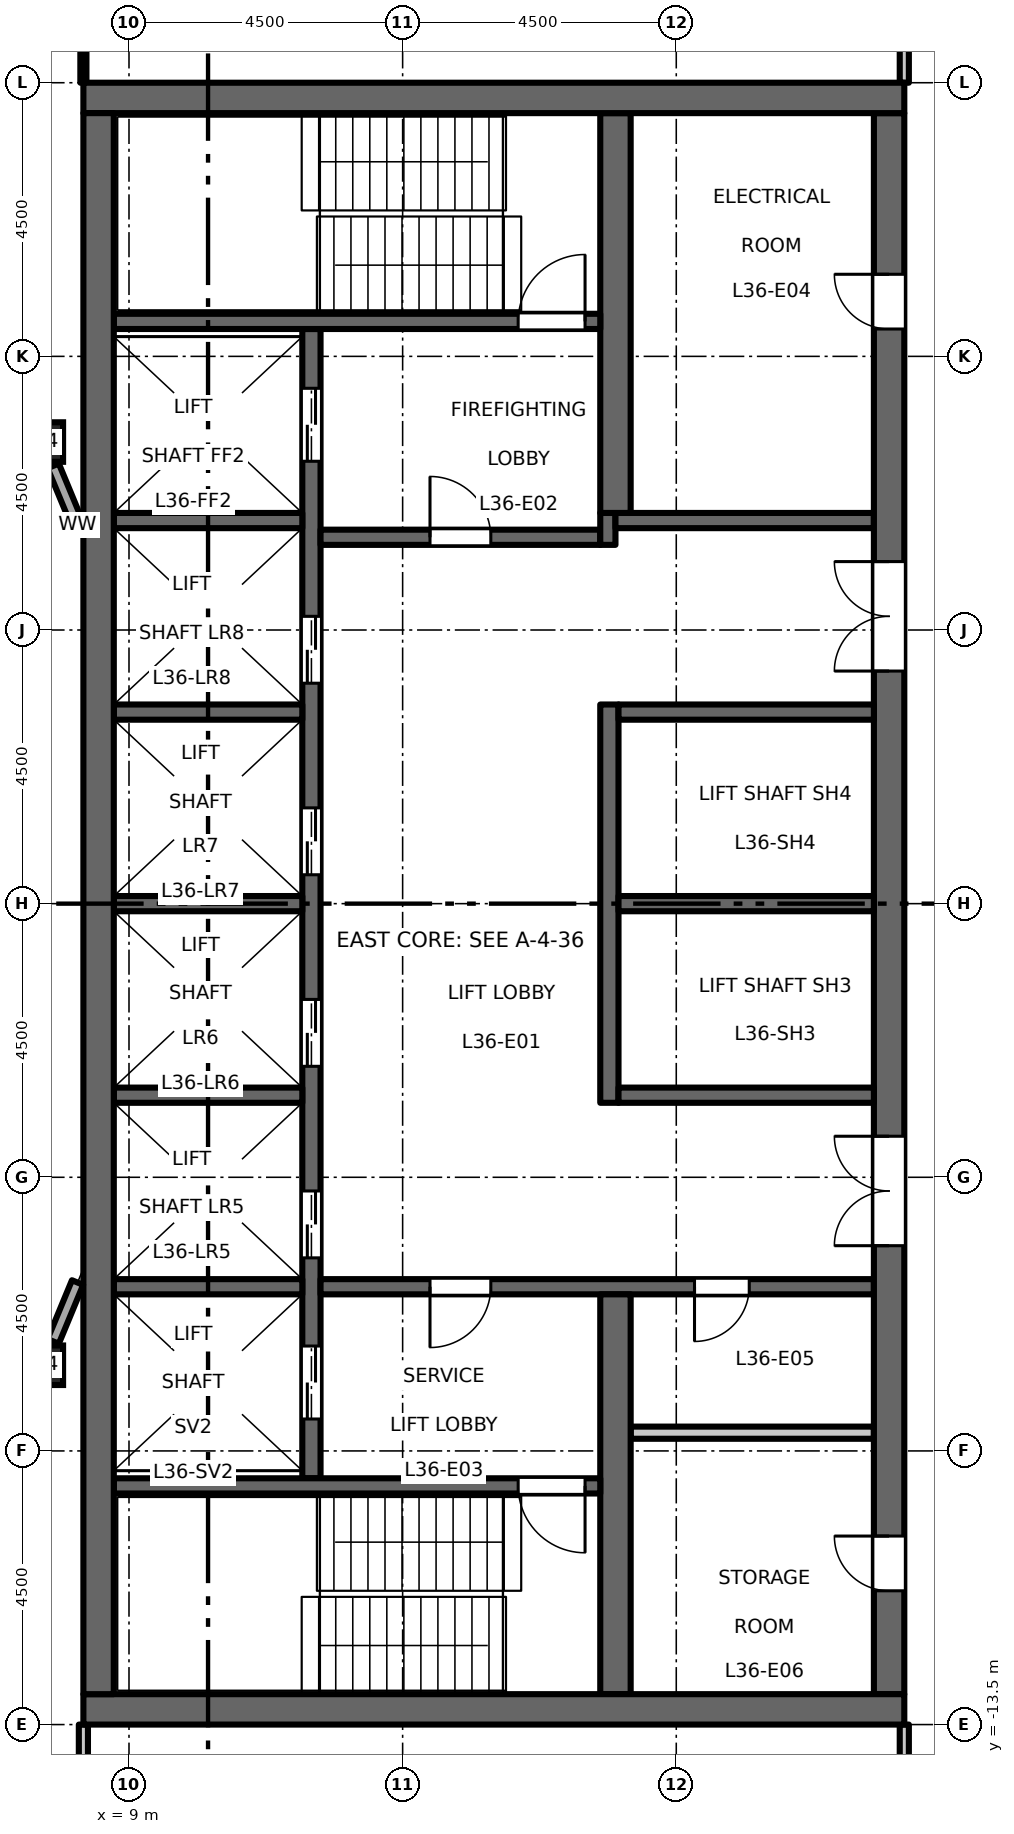
"""IFC4 building model, lengths in metres.
Left out: names, types, materials, properties, quantities, classifications, styles, units other than length and angle.
Written with IfcOpenShell. Run it as: python <this file> out.ifc"""

import sys

from ifc_helpers import new_model, si_unit, direction, frame, frame_2d, origin, origin_2d, place, context, subcontext, project, spatial, rectangle, hollow_rectangle, extrude, element, fill, save


model = new_model("IFC4")
c1 = context("Model", 3, precision=1e-05, world=origin(), true_north=direction((0.0, 1.0)))
c2 = subcontext(c1, "Body", "Model", "MODEL_VIEW")
j1 = project(units=[si_unit("LENGTHUNIT", "METRE"), si_unit("PLANEANGLEUNIT", "RADIAN")], contexts=[c1])
p1 = place(None, origin())
s1 = spatial("IfcSite", under=j1, at=p1, CompositionType="ELEMENT")
p2 = place(p1, origin())
s2 = spatial("IfcBuilding", under=s1, at=p2, CompositionType="ELEMENT")
p3 = place(p2, frame((0.0, 0.0, 167.7)))
s3 = spatial("IfcBuildingStorey", under=s2, at=p3, CompositionType="ELEMENT", Elevation=167.7)
for number, where, z_axis, x_axis in (
    (1, (7.591, -7.591, 0.0), (0.0, 0.0, 1.0), (1.0, 0.0, 0.0)),
    (2, (7.591, 7.591, 0.0), (0.0, 0.0, 1.0), (1.0, 0.0, 0.0)),
):
    element("IfcColumn", number, at=place(p3, frame(where, z_axis=z_axis, x_axis=x_axis)), inside=s3, PredefinedType="COLUMN", context=c2, shape_type="SweptSolid", body=[
        extrude(hollow_rectangle(XDim=0.65, YDim=0.65, WallThickness=0.036, at=origin_2d()), origin(), (0.0, 0.0, 1.0), 4.5),
    ])
p4 = place(p3, frame((12.0, -9.45, 0.0), z_axis=(0.0, 0.0, 1.0), x_axis=(0.0, 1.0, 0.0)))
e3 = element("IfcWall", 3, at=p4, inside=s3, PredefinedType="SHEAR", context=c2, shape_type="SweptSolid", body=[
    extrude(rectangle(XDim=18.9, YDim=0.3, at=frame_2d((9.45, 0.0))), origin(), (0.0, 0.0, 1.0), 4.35),
])
p5 = place(p4, frame((3.625, 0.0, 0.0)))
e4 = element("IfcOpeningElement", 4, at=p5, cuts=e3, PredefinedType="OPENING", context=c2, shape_type="SweptSolid", body=[
    extrude(rectangle(XDim=1.1, YDim=2.1, at=frame_2d((0.55, 1.05))), frame((0.0, 0.16, 0.0), z_axis=(0.0, -1.0, 0.0), x_axis=(1.0, 0.0, 0.0)), (0.0, 0.0, 1.0), 0.32),
])
p6 = place(p4, frame((6.775, 0.0, 0.0)))
e5 = element("IfcOpeningElement", 5, at=p6, cuts=e3, PredefinedType="OPENING", context=c2, shape_type="SweptSolid", body=[
    extrude(rectangle(XDim=1.1, YDim=2.1, at=frame_2d((0.55, 1.05))), frame((0.0, 0.16, 0.0), z_axis=(0.0, -1.0, 0.0), x_axis=(1.0, 0.0, 0.0)), (0.0, 0.0, 1.0), 0.32),
])
p7 = place(p4, frame((9.925, 0.0, 0.0)))
e6 = element("IfcOpeningElement", 6, at=p7, cuts=e3, PredefinedType="OPENING", context=c2, shape_type="SweptSolid", body=[
    extrude(rectangle(XDim=1.1, YDim=2.1, at=frame_2d((0.55, 1.05))), frame((0.0, 0.16, 0.0), z_axis=(0.0, -1.0, 0.0), x_axis=(1.0, 0.0, 0.0)), (0.0, 0.0, 1.0), 0.32),
])
p8 = place(p4, frame((13.075, 0.0, 0.0)))
e7 = element("IfcOpeningElement", 7, at=p8, cuts=e3, PredefinedType="OPENING", context=c2, shape_type="SweptSolid", body=[
    extrude(rectangle(XDim=1.1, YDim=2.1, at=frame_2d((0.55, 1.05))), frame((0.0, 0.16, 0.0), z_axis=(0.0, -1.0, 0.0), x_axis=(1.0, 0.0, 0.0)), (0.0, 0.0, 1.0), 0.32),
])
p9 = place(p4, frame((16.725, 0.0, 0.0)))
e8 = element("IfcOpeningElement", 8, at=p9, cuts=e3, PredefinedType="OPENING", context=c2, shape_type="SweptSolid", body=[
    extrude(rectangle(XDim=1.2, YDim=2.1, at=frame_2d((0.6, 1.05))), frame((0.0, 0.16, 0.0), z_axis=(0.0, -1.0, 0.0), x_axis=(1.0, 0.0, 0.0)), (0.0, 0.0, 1.0), 0.32),
])
p10 = place(p4, frame((0.975, 0.0, 0.0)))
e9 = element("IfcOpeningElement", 9, at=p10, cuts=e3, PredefinedType="OPENING", context=c2, shape_type="SweptSolid", body=[
    extrude(rectangle(XDim=1.2, YDim=2.1, at=frame_2d((0.6, 1.05))), frame((0.0, 0.16, 0.0), z_axis=(0.0, -1.0, 0.0), x_axis=(1.0, 0.0, 0.0)), (0.0, 0.0, 1.0), 0.32),
])
p11 = place(p3, frame((12.15, 6.025, 0.0), z_axis=(0.0, 0.0, 1.0), x_axis=(1.0, 0.0, 0.0)))
e10 = element("IfcWall", 10, at=p11, inside=s3, PredefinedType="SHEAR", context=c2, shape_type="SweptSolid", body=[
    extrude(rectangle(XDim=4.6, YDim=0.25, at=frame_2d((2.3, 0.0))), origin(), (0.0, 0.0, 1.0), 4.35),
])
p12 = place(p11, frame((1.8, 0.0, 0.0)))
e11 = element("IfcOpeningElement", 11, at=p12, cuts=e10, PredefinedType="OPENING", context=c2, shape_type="SweptSolid", body=[
    extrude(rectangle(XDim=1.0, YDim=2.1, at=frame_2d((0.5, 1.05))), frame((0.0, 0.135, 0.0), z_axis=(0.0, -1.0, 0.0), x_axis=(1.0, 0.0, 0.0)), (0.0, 0.0, 1.0), 0.27),
])
p13 = place(p3, frame((16.875, 5.9, 0.0), z_axis=(0.0, 0.0, 1.0), x_axis=(0.0, 1.0, 0.0)))
e12 = element("IfcWall", 12, at=p13, inside=s3, PredefinedType="SHEAR", context=c2, shape_type="SweptSolid", body=[
    extrude(rectangle(XDim=0.525, YDim=0.25, at=frame_2d((0.263, 0.0))), origin(), (0.0, 0.0, 1.0), 4.35),
])
p14 = place(p3, frame((17.0, 6.3, 0.0), z_axis=(0.0, 0.0, 1.0), x_axis=(1.0, 0.0, 0.0)))
e13 = element("IfcWall", 13, at=p14, inside=s3, PredefinedType="SHEAR", context=c2, shape_type="SweptSolid", body=[
    extrude(rectangle(XDim=4.25, YDim=0.25, at=frame_2d((2.125, 0.0))), origin(), (0.0, 0.0, 1.0), 4.35),
])
p15 = place(p3, frame((12.15, -6.3, 0.0), z_axis=(0.0, 0.0, 1.0), x_axis=(1.0, 0.0, 0.0)))
e14 = element("IfcWall", 14, at=p15, inside=s3, PredefinedType="SHEAR", context=c2, shape_type="SweptSolid", body=[
    extrude(rectangle(XDim=9.1, YDim=0.25, at=frame_2d((4.55, 0.0))), origin(), (0.0, 0.0, 1.0), 4.35),
])
p16 = place(p15, frame((1.8, 0.0, 0.0)))
e15 = element("IfcOpeningElement", 15, at=p16, cuts=e14, PredefinedType="OPENING", context=c2, shape_type="SweptSolid", body=[
    extrude(rectangle(XDim=1.0, YDim=2.1, at=frame_2d((0.5, 1.05))), frame((0.0, 0.135, 0.0), z_axis=(0.0, -1.0, 0.0), x_axis=(1.0, 0.0, 0.0)), (0.0, 0.0, 1.0), 0.27),
])
p17 = place(p15, frame((6.15, 0.0, 0.0)))
e16 = element("IfcOpeningElement", 16, at=p17, cuts=e14, PredefinedType="OPENING", context=c2, shape_type="SweptSolid", body=[
    extrude(rectangle(XDim=0.9, YDim=2.1, at=frame_2d((0.45, 1.05))), frame((0.0, 0.135, 0.0), z_axis=(0.0, -1.0, 0.0), x_axis=(1.0, 0.0, 0.0)), (0.0, 0.0, 1.0), 0.27),
])
p18 = place(p3, frame((21.5, -13.0, 0.0), z_axis=(0.0, 0.0, 1.0), x_axis=(0.0, 1.0, 0.0)))
e17 = element("IfcWall", 17, at=p18, inside=s3, PredefinedType="SHEAR", context=c2, shape_type="SweptSolid", body=[
    extrude(rectangle(XDim=26.0, YDim=0.5, at=frame_2d((13.0, 0.0))), origin(), (0.0, 0.0, 1.0), 4.35),
])
p19 = place(p18, frame((16.825, 0.0, 0.0)))
e18 = element("IfcOpeningElement", 18, at=p19, cuts=e17, PredefinedType="OPENING", context=c2, shape_type="SweptSolid", body=[
    extrude(rectangle(XDim=1.8, YDim=2.1, at=frame_2d((0.9, 1.05))), frame((0.0, 0.26, 0.0), z_axis=(0.0, -1.0, 0.0), x_axis=(1.0, 0.0, 0.0)), (0.0, 0.0, 1.0), 0.52),
])
p20 = place(p18, frame((7.375, 0.0, 0.0)))
e19 = element("IfcOpeningElement", 19, at=p20, cuts=e17, PredefinedType="OPENING", context=c2, shape_type="SweptSolid", body=[
    extrude(rectangle(XDim=1.8, YDim=2.1, at=frame_2d((0.9, 1.05))), frame((0.0, 0.26, 0.0), z_axis=(0.0, -1.0, 0.0), x_axis=(1.0, 0.0, 0.0)), (0.0, 0.0, 1.0), 0.52),
])
p21 = place(p18, frame((22.45, 0.0, 0.0)))
e20 = element("IfcOpeningElement", 20, at=p21, cuts=e17, PredefinedType="OPENING", context=c2, shape_type="SweptSolid", body=[
    extrude(rectangle(XDim=0.9, YDim=2.1, at=frame_2d((0.45, 1.05))), frame((0.0, 0.26, 0.0), z_axis=(0.0, -1.0, 0.0), x_axis=(1.0, 0.0, 0.0)), (0.0, 0.0, 1.0), 0.52),
])
p22 = place(p18, frame((1.7, 0.0, 0.0)))
e21 = element("IfcOpeningElement", 21, at=p22, cuts=e17, PredefinedType="OPENING", context=c2, shape_type="SweptSolid", body=[
    extrude(rectangle(XDim=0.9, YDim=2.1, at=frame_2d((0.45, 1.05))), frame((0.0, 0.26, 0.0), z_axis=(0.0, -1.0, 0.0), x_axis=(1.0, 0.0, 0.0)), (0.0, 0.0, 1.0), 0.52),
])
p23 = place(p3, frame((17.25, -8.7, 0.0), z_axis=(0.0, 0.0, 1.0), x_axis=(1.0, 0.0, 0.0)))
e22 = element("IfcWall", 22, at=p23, inside=s3, PredefinedType="PARTITIONING", context=c2, shape_type="SweptSolid", body=[
    extrude(rectangle(XDim=4.0, YDim=0.2, at=frame_2d((2.0, 0.0))), origin(), (0.0, 0.0, 1.0), 4.35),
])
p24 = place(p3, frame((16.9, -3.275, 0.0), z_axis=(0.0, 0.0, 1.0), x_axis=(0.0, 1.0, 0.0)))
e23 = element("IfcWall", 23, at=p24, inside=s3, PredefinedType="SHEAR", context=c2, shape_type="SweptSolid", body=[
    extrude(rectangle(XDim=6.55, YDim=0.3, at=frame_2d((3.275, 0.0))), origin(), (0.0, 0.0, 1.0), 4.35),
])
for number, where, z_axis, x_axis in (
    (24, (17.05, 0.0, 0.0), (0.0, 0.0, 1.0), (1.0, 0.0, 0.0)),
    (25, (17.05, 3.15, 0.0), (0.0, 0.0, 1.0), (1.0, 0.0, 0.0)),
    (26, (17.05, -3.15, 0.0), (0.0, 0.0, 1.0), (1.0, 0.0, 0.0)),
):
    element("IfcWall", number, at=place(p3, frame(where, z_axis=z_axis, x_axis=x_axis)), inside=s3, PredefinedType="SHEAR", context=c2, shape_type="SweptSolid", body=[
        extrude(rectangle(XDim=4.2, YDim=0.25, at=frame_2d((2.1, 0.0))), origin(), (0.0, 0.0, 1.0), 4.35),
    ])
for number, where, z_axis, x_axis in (
    (27, (17.0, 6.425, 0.0), (0.0, 0.0, 1.0), (0.0, 1.0, 0.0)),
    (28, (17.0, -13.0, 0.0), (0.0, 0.0, 1.0), (0.0, 1.0, 0.0)),
):
    element("IfcWall", number, at=place(p3, frame(where, z_axis=z_axis, x_axis=x_axis)), inside=s3, PredefinedType="SHEAR", context=c2, shape_type="SweptSolid", body=[
        extrude(rectangle(XDim=6.575, YDim=0.5, at=frame_2d((3.288, 0.0))), origin(), (0.0, 0.0, 1.0), 4.35),
    ])
for number, where, z_axis, x_axis in (
    (29, (8.75, 0.0, 0.0), (0.0, 0.0, 1.0), (1.0, 0.0, 0.0)),
    (30, (8.75, 3.15, 0.0), (0.0, 0.0, 1.0), (1.0, 0.0, 0.0)),
    (31, (8.75, 6.3, 0.0), (0.0, 0.0, 1.0), (1.0, 0.0, 0.0)),
    (32, (8.75, -3.15, 0.0), (0.0, 0.0, 1.0), (1.0, 0.0, 0.0)),
    (33, (8.75, -6.3, 0.0), (0.0, 0.0, 1.0), (1.0, 0.0, 0.0)),
):
    element("IfcWall", number, at=place(p3, frame(where, z_axis=z_axis, x_axis=x_axis)), inside=s3, PredefinedType="SHEAR", context=c2, shape_type="SweptSolid", body=[
        extrude(rectangle(XDim=3.1, YDim=0.25, at=frame_2d((1.55, 0.0))), origin(), (0.0, 0.0, 1.0), 4.35),
    ])
p25 = place(p3, frame((8.75, 9.575, 0.0), z_axis=(0.0, 0.0, 1.0), x_axis=(1.0, 0.0, 0.0)))
e34 = element("IfcWall", 34, at=p25, inside=s3, PredefinedType="SHEAR", context=c2, shape_type="SweptSolid", body=[
    extrude(rectangle(XDim=8.0, YDim=0.25, at=frame_2d((4.0, 0.0))), origin(), (0.0, 0.0, 1.0), 4.35),
])
p26 = place(p25, frame((6.65, 0.0, 0.0)))
e35 = element("IfcOpeningElement", 35, at=p26, cuts=e34, PredefinedType="OPENING", context=c2, shape_type="SweptSolid", body=[
    extrude(rectangle(XDim=1.1, YDim=2.1, at=frame_2d((0.55, 1.05))), frame((0.0, 0.135, 0.0), z_axis=(0.0, -1.0, 0.0), x_axis=(1.0, 0.0, 0.0)), (0.0, 0.0, 1.0), 0.27),
])
p27 = place(p3, frame((8.75, -9.575, 0.0), z_axis=(0.0, 0.0, 1.0), x_axis=(1.0, 0.0, 0.0)))
e36 = element("IfcWall", 36, at=p27, inside=s3, PredefinedType="SHEAR", context=c2, shape_type="SweptSolid", body=[
    extrude(rectangle(XDim=8.0, YDim=0.25, at=frame_2d((4.0, 0.0))), origin(), (0.0, 0.0, 1.0), 4.35),
])
p28 = place(p27, frame((6.65, 0.0, 0.0)))
e37 = element("IfcOpeningElement", 37, at=p28, cuts=e36, PredefinedType="OPENING", context=c2, shape_type="SweptSolid", body=[
    extrude(rectangle(XDim=1.1, YDim=2.1, at=frame_2d((0.55, 1.05))), frame((0.0, 0.135, 0.0), z_axis=(0.0, -1.0, 0.0), x_axis=(1.0, 0.0, 0.0)), (0.0, 0.0, 1.0), 0.27),
])
for number, where, z_axis, x_axis in (
    (38, (8.25, 13.25, 0.0), (0.0, 0.0, 1.0), (1.0, 0.0, 0.0)),
    (39, (8.25, -13.25, 0.0), (0.0, 0.0, 1.0), (1.0, 0.0, 0.0)),
):
    element("IfcWall", number, at=place(p3, frame(where, z_axis=z_axis, x_axis=x_axis)), inside=s3, PredefinedType="SHEAR", context=c2, shape_type="SweptSolid", body=[
        extrude(rectangle(XDim=13.5, YDim=0.5, at=frame_2d((6.75, 0.0))), origin(), (0.0, 0.0, 1.0), 4.35),
    ])
p29 = place(p3, frame((8.5, -13.0, 0.0), z_axis=(0.0, 0.0, 1.0), x_axis=(0.0, 1.0, 0.0)))
e40 = element("IfcWall", 40, at=p29, inside=s3, PredefinedType="SHEAR", context=c2, shape_type="SweptSolid", body=[
    extrude(rectangle(XDim=26.0, YDim=0.5, at=frame_2d((13.0, 0.0))), origin(), (0.0, 0.0, 1.0), 4.35),
])
for number, where, z_axis, x_axis in (
    (41, (7.753, -7.199, 0.0), (0.0, 0.0, 1.0), (0.383, 0.924, 0.0)),
    (42, (8.154, 6.231, 0.0), (0.0, 0.0, 1.0), (-0.383, 0.924, 0.0)),
):
    element("IfcWall", number, at=place(p3, frame(where, z_axis=z_axis, x_axis=x_axis)), inside=s3, PredefinedType="STANDARD", context=c2, shape_type="SweptSolid", body=[
        extrude(rectangle(XDim=1.048, YDim=0.2, at=frame_2d((0.524, 0.0))), origin(), (0.0, 0.0, 1.0), 3.826),
    ])
p30 = place(p3, frame((8.25, 13.5, 0.0), z_axis=(0.0, 0.0, 1.0), x_axis=(0.0, 1.0, 0.0)))
e43 = element("IfcWall", 43, at=p30, inside=s3, PredefinedType="PARTITIONING", context=c2, shape_type="SweptSolid", body=[
    extrude(rectangle(XDim=4.425, YDim=0.1, at=frame_2d((2.212, 0.0))), origin(), (0.0, 0.0, 1.0), 4.35),
])
p31 = place(p3, frame((8.25, -15.8, 0.0), z_axis=(0.0, 0.0, 1.0), x_axis=(0.0, 1.0, 0.0)))
e44 = element("IfcWall", 44, at=p31, inside=s3, PredefinedType="PARTITIONING", context=c2, shape_type="SweptSolid", body=[
    extrude(rectangle(XDim=2.3, YDim=0.15, at=frame_2d((1.15, 0.0))), origin(), (0.0, 0.0, 1.0), 4.35),
])
for number, where, z_axis, x_axis in (
    (45, (21.75, -17.925, 0.0), (0.0, 0.0, 1.0), (0.0, 1.0, 0.0)),
    (46, (21.75, 13.5, 0.0), (0.0, 0.0, 1.0), (0.0, 1.0, 0.0)),
):
    element("IfcWall", number, at=place(p3, frame(where, z_axis=z_axis, x_axis=x_axis)), inside=s3, PredefinedType="PARTITIONING", context=c2, shape_type="SweptSolid", body=[
        extrude(rectangle(XDim=4.425, YDim=0.15, at=frame_2d((2.212, 0.0))), origin(), (0.0, 0.0, 1.0), 4.35),
    ])
p32 = place(p12, origin())
e47 = element("IfcDoor", 47, at=p32, inside=s3, OperationType="SINGLE_SWING_RIGHT", PredefinedType="DOOR", context=c2, shape_type="SweptSolid", body=[
    extrude(rectangle(XDim=1.0, YDim=2.1, at=frame_2d((0.5, 1.05))), frame((0.0, 0.025, 0.0), z_axis=(0.0, -1.0, 0.0), x_axis=(1.0, 0.0, 0.0)), (0.0, 0.0, 1.0), 0.05),
])
fill(e11, e47)
p33 = place(p16, origin())
e48 = element("IfcDoor", 48, at=p33, inside=s3, OperationType="SINGLE_SWING_LEFT", PredefinedType="DOOR", context=c2, shape_type="SweptSolid", body=[
    extrude(rectangle(XDim=1.0, YDim=2.1, at=frame_2d((0.5, 1.05))), frame((0.0, 0.025, 0.0), z_axis=(0.0, -1.0, 0.0), x_axis=(1.0, 0.0, 0.0)), (0.0, 0.0, 1.0), 0.05),
])
fill(e15, e48)
p34 = place(p26, origin())
e49 = element("IfcDoor", 49, at=p34, inside=s3, OperationType="SINGLE_SWING_LEFT", PredefinedType="DOOR", context=c2, shape_type="SweptSolid", body=[
    extrude(rectangle(XDim=1.1, YDim=2.1, at=frame_2d((0.55, 1.05))), frame((0.0, 0.025, 0.0), z_axis=(0.0, -1.0, 0.0), x_axis=(1.0, 0.0, 0.0)), (0.0, 0.0, 1.0), 0.05),
])
fill(e35, e49)
p35 = place(p28, origin())
e50 = element("IfcDoor", 50, at=p35, inside=s3, OperationType="SINGLE_SWING_RIGHT", PredefinedType="DOOR", context=c2, shape_type="SweptSolid", body=[
    extrude(rectangle(XDim=1.1, YDim=2.1, at=frame_2d((0.55, 1.05))), frame((0.0, 0.025, 0.0), z_axis=(0.0, -1.0, 0.0), x_axis=(1.0, 0.0, 0.0)), (0.0, 0.0, 1.0), 0.05),
])
fill(e37, e50)
p36 = place(p19, origin())
e51 = element("IfcDoor", 51, at=p36, inside=s3, OperationType="DOUBLE_DOOR_DOUBLE_SWING", PredefinedType="DOOR", context=c2, shape_type="SweptSolid", body=[
    extrude(rectangle(XDim=1.8, YDim=2.1, at=frame_2d((0.9, 1.05))), frame((0.0, 0.025, 0.0), z_axis=(0.0, -1.0, 0.0), x_axis=(1.0, 0.0, 0.0)), (0.0, 0.0, 1.0), 0.05),
])
fill(e18, e51)
p37 = place(p20, origin())
e52 = element("IfcDoor", 52, at=p37, inside=s3, OperationType="DOUBLE_DOOR_DOUBLE_SWING", PredefinedType="DOOR", context=c2, shape_type="SweptSolid", body=[
    extrude(rectangle(XDim=1.8, YDim=2.1, at=frame_2d((0.9, 1.05))), frame((0.0, 0.025, 0.0), z_axis=(0.0, -1.0, 0.0), x_axis=(1.0, 0.0, 0.0)), (0.0, 0.0, 1.0), 0.05),
])
fill(e19, e52)
p38 = place(p5, origin())
e53 = element("IfcDoor", 53, at=p38, inside=s3, OperationType="DOUBLE_DOOR_SLIDING", PredefinedType="DOOR", context=c2, shape_type="SweptSolid", body=[
    extrude(rectangle(XDim=1.1, YDim=2.1, at=frame_2d((0.55, 1.05))), frame((0.0, 0.025, 0.0), z_axis=(0.0, -1.0, 0.0), x_axis=(1.0, 0.0, 0.0)), (0.0, 0.0, 1.0), 0.05),
])
fill(e4, e53)
p39 = place(p6, origin())
e54 = element("IfcDoor", 54, at=p39, inside=s3, OperationType="DOUBLE_DOOR_SLIDING", PredefinedType="DOOR", context=c2, shape_type="SweptSolid", body=[
    extrude(rectangle(XDim=1.1, YDim=2.1, at=frame_2d((0.55, 1.05))), frame((0.0, 0.025, 0.0), z_axis=(0.0, -1.0, 0.0), x_axis=(1.0, 0.0, 0.0)), (0.0, 0.0, 1.0), 0.05),
])
fill(e5, e54)
p40 = place(p7, origin())
e55 = element("IfcDoor", 55, at=p40, inside=s3, OperationType="DOUBLE_DOOR_SLIDING", PredefinedType="DOOR", context=c2, shape_type="SweptSolid", body=[
    extrude(rectangle(XDim=1.1, YDim=2.1, at=frame_2d((0.55, 1.05))), frame((0.0, 0.025, 0.0), z_axis=(0.0, -1.0, 0.0), x_axis=(1.0, 0.0, 0.0)), (0.0, 0.0, 1.0), 0.05),
])
fill(e6, e55)
p41 = place(p8, origin())
e56 = element("IfcDoor", 56, at=p41, inside=s3, OperationType="DOUBLE_DOOR_SLIDING", PredefinedType="DOOR", context=c2, shape_type="SweptSolid", body=[
    extrude(rectangle(XDim=1.1, YDim=2.1, at=frame_2d((0.55, 1.05))), frame((0.0, 0.025, 0.0), z_axis=(0.0, -1.0, 0.0), x_axis=(1.0, 0.0, 0.0)), (0.0, 0.0, 1.0), 0.05),
])
fill(e7, e56)
p42 = place(p9, origin())
e57 = element("IfcDoor", 57, at=p42, inside=s3, OperationType="DOUBLE_DOOR_SLIDING", PredefinedType="DOOR", context=c2, shape_type="SweptSolid", body=[
    extrude(rectangle(XDim=1.2, YDim=2.1, at=frame_2d((0.6, 1.05))), frame((0.0, 0.025, 0.0), z_axis=(0.0, -1.0, 0.0), x_axis=(1.0, 0.0, 0.0)), (0.0, 0.0, 1.0), 0.05),
])
fill(e8, e57)
p43 = place(p10, origin())
e58 = element("IfcDoor", 58, at=p43, inside=s3, OperationType="DOUBLE_DOOR_SLIDING", PredefinedType="DOOR", context=c2, shape_type="SweptSolid", body=[
    extrude(rectangle(XDim=1.2, YDim=2.1, at=frame_2d((0.6, 1.05))), frame((0.0, 0.025, 0.0), z_axis=(0.0, -1.0, 0.0), x_axis=(1.0, 0.0, 0.0)), (0.0, 0.0, 1.0), 0.05),
])
fill(e9, e58)
p44 = place(p21, origin())
e59 = element("IfcDoor", 59, at=p44, inside=s3, OperationType="SINGLE_SWING_LEFT", PredefinedType="DOOR", context=c2, shape_type="SweptSolid", body=[
    extrude(rectangle(XDim=0.9, YDim=2.1, at=frame_2d((0.45, 1.05))), frame((0.0, 0.025, 0.0), z_axis=(0.0, -1.0, 0.0), x_axis=(1.0, 0.0, 0.0)), (0.0, 0.0, 1.0), 0.05),
])
fill(e20, e59)
p45 = place(p17, origin())
e60 = element("IfcDoor", 60, at=p45, inside=s3, OperationType="SINGLE_SWING_LEFT", PredefinedType="DOOR", context=c2, shape_type="SweptSolid", body=[
    extrude(rectangle(XDim=0.9, YDim=2.1, at=frame_2d((0.45, 1.05))), frame((0.0, 0.025, 0.0), z_axis=(0.0, -1.0, 0.0), x_axis=(1.0, 0.0, 0.0)), (0.0, 0.0, 1.0), 0.05),
])
fill(e16, e60)
p46 = place(p22, origin())
e61 = element("IfcDoor", 61, at=p46, inside=s3, OperationType="SINGLE_SWING_LEFT", PredefinedType="DOOR", context=c2, shape_type="SweptSolid", body=[
    extrude(rectangle(XDim=0.9, YDim=2.1, at=frame_2d((0.45, 1.05))), frame((0.0, 0.025, 0.0), z_axis=(0.0, -1.0, 0.0), x_axis=(1.0, 0.0, 0.0)), (0.0, 0.0, 1.0), 0.05),
])
fill(e21, e61)
save(model, sys.argv[1])
